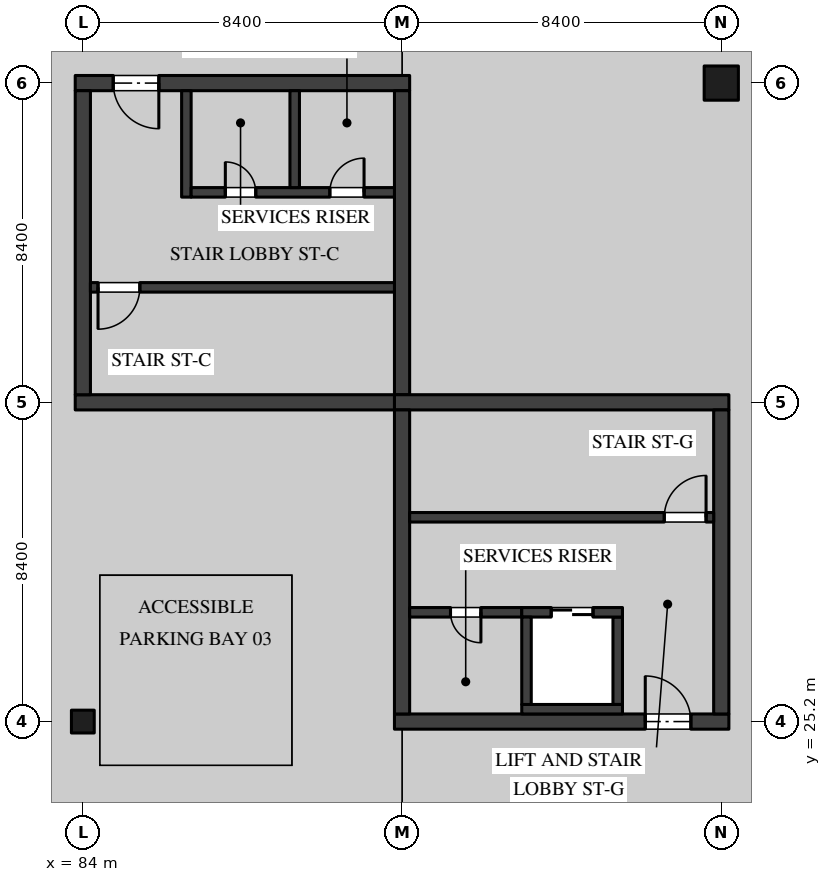
"""IFC4 building model, lengths in metres.
Left out: names, types, materials, properties, quantities, classifications, styles, units other than length and angle.
Written with IfcOpenShell. Run it as: python <this file> out.ifc"""

import sys

from ifc_helpers import new_model, si_unit, direction, frame, frame_2d, origin, origin_2d, place, context, subcontext, project, spatial, rectangle, extrude, element, fill, save


model = new_model("IFC4")
c1 = context("Model", 3, precision=1e-05, world=origin(), true_north=direction((0.0, 1.0)))
c2 = subcontext(c1, "Body", "Model", "MODEL_VIEW")
j1 = project(units=[si_unit("LENGTHUNIT", "METRE"), si_unit("PLANEANGLEUNIT", "RADIAN")], contexts=[c1])
p1 = place(None, origin())
s1 = spatial("IfcSite", under=j1, at=p1, CompositionType="ELEMENT")
p2 = place(p1, origin())
s2 = spatial("IfcBuilding", under=s1, at=p2, CompositionType="ELEMENT")
p3 = place(p2, frame((0.0, 0.0, -4.5)))
s3 = spatial("IfcBuildingStorey", under=s2, at=p3, CompositionType="ELEMENT", Elevation=-4.5)
p4 = place(p3, frame((84.0, 25.2, 0.0), z_axis=(0.0, 0.0, 1.0), x_axis=(1.0, 0.0, 0.0)))
e1 = element("IfcColumn", 1, at=p4, inside=s3, PredefinedType="COLUMN", context=c2, shape_type="SweptSolid", body=[
    extrude(rectangle(XDim=0.6, YDim=0.6, at=origin_2d()), origin(), (0.0, 0.0, 1.0), 4.05),
])
p5 = place(p3, frame((100.8, 42.0, 0.0), z_axis=(0.0, 0.0, 1.0), x_axis=(1.0, 0.0, 0.0)))
e2 = element("IfcColumn", 2, at=p5, inside=s3, PredefinedType="COLUMN", context=c2, shape_type="SweptSolid", body=[
    extrude(rectangle(XDim=0.9, YDim=0.9, at=origin_2d()), origin(), (0.0, 0.0, 1.0), 4.05),
])
p6 = place(p3, frame((83.8, 33.6, 0.0), z_axis=(0.0, 0.0, 1.0), x_axis=(1.0, 0.0, 0.0)))
e3 = element("IfcWall", 3, at=p6, inside=s3, PredefinedType="SHEAR", context=c2, shape_type="SweptSolid", body=[
    extrude(rectangle(XDim=8.8, YDim=0.4, at=frame_2d((4.4, 0.0))), origin(), (0.0, 0.0, 1.0), 4.05),
])
p7 = place(p3, frame((83.8, 42.0, 0.0), z_axis=(0.0, 0.0, 1.0), x_axis=(1.0, 0.0, 0.0)))
e4 = element("IfcWall", 4, at=p7, inside=s3, PredefinedType="SHEAR", context=c2, shape_type="SweptSolid", body=[
    extrude(rectangle(XDim=8.8, YDim=0.4, at=frame_2d((4.4, 0.0))), origin(), (0.0, 0.0, 1.0), 4.05),
])
p8 = place(p7, frame((1.0, 0.0, 0.0)))
e5 = element("IfcOpeningElement", 5, at=p8, cuts=e4, PredefinedType="OPENING", context=c2, shape_type="SweptSolid", body=[
    extrude(rectangle(XDim=1.2, YDim=2.1, at=frame_2d((0.6, 1.05))), frame((0.0, 0.21, 0.0), z_axis=(0.0, -1.0, 0.0), x_axis=(1.0, 0.0, 0.0)), (0.0, 0.0, 1.0), 0.42),
])
for number, where, z_axis, x_axis in (
    (6, (84.0, 33.8, 0.0), (0.0, 0.0, 1.0), (0.0, 1.0, 0.0)),
    (7, (92.4, 33.8, 0.0), (0.0, 0.0, 1.0), (0.0, 1.0, 0.0)),
):
    element("IfcWall", number, at=place(p3, frame(where, z_axis=z_axis, x_axis=x_axis)), inside=s3, PredefinedType="SHEAR", context=c2, shape_type="SweptSolid", body=[
        extrude(rectangle(XDim=8.0, YDim=0.4, at=frame_2d((4.0, 0.0))), origin(), (0.0, 0.0, 1.0), 4.05),
    ])
p9 = place(p3, frame((84.2, 36.625, 0.0), z_axis=(0.0, 0.0, 1.0), x_axis=(1.0, 0.0, 0.0)))
e8 = element("IfcWall", 8, at=p9, inside=s3, PredefinedType="SOLIDWALL", context=c2, shape_type="SweptSolid", body=[
    extrude(rectangle(XDim=8.0, YDim=0.25, at=frame_2d((4.0, 0.0))), origin(), (0.0, 0.0, 1.0), 4.05),
])
p10 = place(p9, frame((0.2, 0.0, 0.0)))
e9 = element("IfcOpeningElement", 9, at=p10, cuts=e8, PredefinedType="OPENING", context=c2, shape_type="SweptSolid", body=[
    extrude(rectangle(XDim=1.1, YDim=2.1, at=frame_2d((0.55, 1.05))), frame((0.0, 0.135, 0.0), z_axis=(0.0, -1.0, 0.0), x_axis=(1.0, 0.0, 0.0)), (0.0, 0.0, 1.0), 0.27),
])
p11 = place(p3, frame((86.725, 39.0, 0.0), z_axis=(0.0, 0.0, 1.0), x_axis=(0.0, 1.0, 0.0)))
e10 = element("IfcWall", 10, at=p11, inside=s3, PredefinedType="SOLIDWALL", context=c2, shape_type="SweptSolid", body=[
    extrude(rectangle(XDim=2.8, YDim=0.25, at=frame_2d((1.4, 0.0))), origin(), (0.0, 0.0, 1.0), 4.05),
])
p12 = place(p3, frame((86.85, 39.125, 0.0), z_axis=(0.0, 0.0, 1.0), x_axis=(1.0, 0.0, 0.0)))
e11 = element("IfcWall", 11, at=p12, inside=s3, PredefinedType="SOLIDWALL", context=c2, shape_type="SweptSolid", body=[
    extrude(rectangle(XDim=5.35, YDim=0.25, at=frame_2d((2.675, 0.0))), origin(), (0.0, 0.0, 1.0), 4.05),
])
p13 = place(p12, frame((3.65, 0.0, 0.0)))
e12 = element("IfcOpeningElement", 12, at=p13, cuts=e11, PredefinedType="OPENING", context=c2, shape_type="SweptSolid", body=[
    extrude(rectangle(XDim=0.9, YDim=2.1, at=frame_2d((0.45, 1.05))), frame((0.0, 0.135, 0.0), z_axis=(0.0, -1.0, 0.0), x_axis=(1.0, 0.0, 0.0)), (0.0, 0.0, 1.0), 0.27),
])
p14 = place(p12, frame((0.9, 0.0, 0.0)))
e13 = element("IfcOpeningElement", 13, at=p14, cuts=e11, PredefinedType="OPENING", context=c2, shape_type="SweptSolid", body=[
    extrude(rectangle(XDim=0.8, YDim=2.1, at=frame_2d((0.4, 1.05))), frame((0.0, 0.135, 0.0), z_axis=(0.0, -1.0, 0.0), x_axis=(1.0, 0.0, 0.0)), (0.0, 0.0, 1.0), 0.27),
])
p15 = place(p3, frame((89.575, 39.25, 0.0), z_axis=(0.0, 0.0, 1.0), x_axis=(0.0, 1.0, 0.0)))
e14 = element("IfcWall", 14, at=p15, inside=s3, PredefinedType="SOLIDWALL", context=c2, shape_type="SweptSolid", body=[
    extrude(rectangle(XDim=2.55, YDim=0.25, at=frame_2d((1.275, 0.0))), origin(), (0.0, 0.0, 1.0), 4.05),
])
p16 = place(p3, frame((92.2, 25.2, 0.0), z_axis=(0.0, 0.0, 1.0), x_axis=(1.0, 0.0, 0.0)))
e15 = element("IfcWall", 15, at=p16, inside=s3, PredefinedType="SHEAR", context=c2, shape_type="SweptSolid", body=[
    extrude(rectangle(XDim=8.8, YDim=0.4, at=frame_2d((4.4, 0.0))), origin(), (0.0, 0.0, 1.0), 4.05),
])
p17 = place(p16, frame((6.6, 0.0, 0.0)))
e16 = element("IfcOpeningElement", 16, at=p17, cuts=e15, PredefinedType="OPENING", context=c2, shape_type="SweptSolid", body=[
    extrude(rectangle(XDim=1.2, YDim=2.1, at=frame_2d((0.6, 1.05))), frame((0.0, 0.21, 0.0), z_axis=(0.0, -1.0, 0.0), x_axis=(1.0, 0.0, 0.0)), (0.0, 0.0, 1.0), 0.42),
])
p18 = place(p3, frame((92.2, 33.6, 0.0), z_axis=(0.0, 0.0, 1.0), x_axis=(1.0, 0.0, 0.0)))
e17 = element("IfcWall", 17, at=p18, inside=s3, PredefinedType="SHEAR", context=c2, shape_type="SweptSolid", body=[
    extrude(rectangle(XDim=8.8, YDim=0.4, at=frame_2d((4.4, 0.0))), origin(), (0.0, 0.0, 1.0), 4.05),
])
for number, where, z_axis, x_axis in (
    (18, (92.4, 25.4, 0.0), (0.0, 0.0, 1.0), (0.0, 1.0, 0.0)),
    (19, (100.8, 25.4, 0.0), (0.0, 0.0, 1.0), (0.0, 1.0, 0.0)),
):
    element("IfcWall", number, at=place(p3, frame(where, z_axis=z_axis, x_axis=x_axis)), inside=s3, PredefinedType="SHEAR", context=c2, shape_type="SweptSolid", body=[
        extrude(rectangle(XDim=8.0, YDim=0.4, at=frame_2d((4.0, 0.0))), origin(), (0.0, 0.0, 1.0), 4.05),
    ])
p19 = place(p3, frame((100.6, 30.575, 0.0), z_axis=(0.0, 0.0, 1.0), x_axis=(-1.0, 0.0, 0.0)))
e20 = element("IfcWall", 20, at=p19, inside=s3, PredefinedType="SOLIDWALL", context=c2, shape_type="SweptSolid", body=[
    extrude(rectangle(XDim=8.0, YDim=0.25, at=frame_2d((4.0, 0.0))), origin(), (0.0, 0.0, 1.0), 4.05),
])
p20 = place(p19, frame((0.2, 0.0, 0.0)))
e21 = element("IfcOpeningElement", 21, at=p20, cuts=e20, PredefinedType="OPENING", context=c2, shape_type="SweptSolid", body=[
    extrude(rectangle(XDim=1.1, YDim=2.1, at=frame_2d((0.55, 1.05))), frame((0.0, 0.135, 0.0), z_axis=(0.0, -1.0, 0.0), x_axis=(1.0, 0.0, 0.0)), (0.0, 0.0, 1.0), 0.27),
])
p21 = place(p3, frame((95.55, 28.075, 0.0), z_axis=(0.0, 0.0, 1.0), x_axis=(-1.0, 0.0, 0.0)))
e22 = element("IfcWall", 22, at=p21, inside=s3, PredefinedType="SOLIDWALL", context=c2, shape_type="SweptSolid", body=[
    extrude(rectangle(XDim=2.95, YDim=0.25, at=frame_2d((1.475, 0.0))), origin(), (0.0, 0.0, 1.0), 4.05),
])
p22 = place(p21, frame((1.075, 0.0, 0.0)))
e23 = element("IfcOpeningElement", 23, at=p22, cuts=e22, PredefinedType="OPENING", context=c2, shape_type="SweptSolid", body=[
    extrude(rectangle(XDim=0.8, YDim=2.1, at=frame_2d((0.4, 1.05))), frame((0.0, 0.135, 0.0), z_axis=(0.0, -1.0, 0.0), x_axis=(1.0, 0.0, 0.0)), (0.0, 0.0, 1.0), 0.27),
])
p23 = place(p3, frame((98.075, 25.65, 0.0), z_axis=(0.0, 0.0, 1.0), x_axis=(0.0, 1.0, 0.0)))
e24 = element("IfcWall", 24, at=p23, inside=s3, PredefinedType="SOLIDWALL", context=c2, shape_type="SweptSolid", body=[
    extrude(rectangle(XDim=2.3, YDim=0.25, at=frame_2d((1.15, 0.0))), origin(), (0.0, 0.0, 1.0), 4.05),
])
p24 = place(p3, frame((95.55, 28.075, 0.0), z_axis=(0.0, 0.0, 1.0), x_axis=(1.0, 0.0, 0.0)))
e25 = element("IfcWall", 25, at=p24, inside=s3, PredefinedType="SOLIDWALL", context=c2, shape_type="SweptSolid", body=[
    extrude(rectangle(XDim=2.65, YDim=0.25, at=frame_2d((1.325, 0.0))), origin(), (0.0, 0.0, 1.0), 4.05),
])
p25 = place(p24, frame((0.775, 0.0, 0.0)))
e26 = element("IfcOpeningElement", 26, at=p25, cuts=e25, PredefinedType="OPENING", context=c2, shape_type="SweptSolid", body=[
    extrude(rectangle(XDim=1.1, YDim=2.1, at=frame_2d((0.55, 1.05))), frame((0.0, 0.135, 0.0), z_axis=(0.0, -1.0, 0.0), x_axis=(1.0, 0.0, 0.0)), (0.0, 0.0, 1.0), 0.27),
])
p26 = place(p3, frame((95.55, 25.525, 0.0), z_axis=(0.0, 0.0, 1.0), x_axis=(1.0, 0.0, 0.0)))
e27 = element("IfcWall", 27, at=p26, inside=s3, PredefinedType="SOLIDWALL", context=c2, shape_type="SweptSolid", body=[
    extrude(rectangle(XDim=2.65, YDim=0.25, at=frame_2d((1.325, 0.0))), origin(), (0.0, 0.0, 1.0), 4.05),
])
p27 = place(p3, frame((95.675, 25.65, 0.0), z_axis=(0.0, 0.0, 1.0), x_axis=(0.0, 1.0, 0.0)))
e28 = element("IfcWall", 28, at=p27, inside=s3, PredefinedType="SOLIDWALL", context=c2, shape_type="SweptSolid", body=[
    extrude(rectangle(XDim=2.3, YDim=0.25, at=frame_2d((1.15, 0.0))), origin(), (0.0, 0.0, 1.0), 4.05),
])
p28 = place(p13, origin())
e29 = element("IfcDoor", 29, at=p28, inside=s3, OperationType="SINGLE_SWING_LEFT", PredefinedType="DOOR", context=c2, shape_type="SweptSolid", body=[
    extrude(rectangle(XDim=0.9, YDim=2.1, at=frame_2d((0.45, 1.05))), frame((0.0, 0.035, 0.0), z_axis=(0.0, -1.0, 0.0), x_axis=(1.0, 0.0, 0.0)), (0.0, 0.0, 1.0), 0.07),
])
fill(e12, e29)
p29 = place(p8, frame((1.2, 0.0, 0.0), z_axis=(0.0, 0.0, 1.0), x_axis=(-1.0, 0.0, 0.0)))
e30 = element("IfcDoor", 30, at=p29, inside=s3, OperationType="SINGLE_SWING_RIGHT", PredefinedType="DOOR", context=c2, shape_type="SweptSolid", body=[
    extrude(rectangle(XDim=1.2, YDim=2.1, at=frame_2d((0.6, 1.05))), frame((0.0, 0.035, 0.0), z_axis=(0.0, -1.0, 0.0), x_axis=(1.0, 0.0, 0.0)), (0.0, 0.0, 1.0), 0.07),
])
fill(e5, e30)
p30 = place(p14, origin())
e31 = element("IfcDoor", 31, at=p30, inside=s3, OperationType="SINGLE_SWING_RIGHT", PredefinedType="DOOR", context=c2, shape_type="SweptSolid", body=[
    extrude(rectangle(XDim=0.8, YDim=2.1, at=frame_2d((0.4, 1.05))), frame((0.0, 0.035, 0.0), z_axis=(0.0, -1.0, 0.0), x_axis=(1.0, 0.0, 0.0)), (0.0, 0.0, 1.0), 0.07),
])
fill(e13, e31)
p31 = place(p10, frame((1.1, 0.0, 0.0), z_axis=(0.0, 0.0, 1.0), x_axis=(-1.0, 0.0, 0.0)))
e32 = element("IfcDoor", 32, at=p31, inside=s3, OperationType="SINGLE_SWING_LEFT", PredefinedType="DOOR", context=c2, shape_type="SweptSolid", body=[
    extrude(rectangle(XDim=1.1, YDim=2.1, at=frame_2d((0.55, 1.05))), frame((0.0, 0.035, 0.0), z_axis=(0.0, -1.0, 0.0), x_axis=(1.0, 0.0, 0.0)), (0.0, 0.0, 1.0), 0.07),
])
fill(e9, e32)
p32 = place(p17, origin())
e33 = element("IfcDoor", 33, at=p32, inside=s3, OperationType="SINGLE_SWING_RIGHT", PredefinedType="DOOR", context=c2, shape_type="SweptSolid", body=[
    extrude(rectangle(XDim=1.2, YDim=2.1, at=frame_2d((0.6, 1.05))), frame((0.0, 0.035, 0.0), z_axis=(0.0, -1.0, 0.0), x_axis=(1.0, 0.0, 0.0)), (0.0, 0.0, 1.0), 0.07),
])
fill(e16, e33)
p33 = place(p22, origin())
e34 = element("IfcDoor", 34, at=p33, inside=s3, OperationType="SINGLE_SWING_RIGHT", PredefinedType="DOOR", context=c2, shape_type="SweptSolid", body=[
    extrude(rectangle(XDim=0.8, YDim=2.1, at=frame_2d((0.4, 1.05))), frame((0.0, 0.035, 0.0), z_axis=(0.0, -1.0, 0.0), x_axis=(1.0, 0.0, 0.0)), (0.0, 0.0, 1.0), 0.07),
])
fill(e23, e34)
p34 = place(p20, frame((1.1, 0.0, 0.0), z_axis=(0.0, 0.0, 1.0), x_axis=(-1.0, 0.0, 0.0)))
e35 = element("IfcDoor", 35, at=p34, inside=s3, OperationType="SINGLE_SWING_LEFT", PredefinedType="DOOR", context=c2, shape_type="SweptSolid", body=[
    extrude(rectangle(XDim=1.1, YDim=2.1, at=frame_2d((0.55, 1.05))), frame((0.0, 0.035, 0.0), z_axis=(0.0, -1.0, 0.0), x_axis=(1.0, 0.0, 0.0)), (0.0, 0.0, 1.0), 0.07),
])
fill(e21, e35)
p35 = place(p25, origin())
e36 = element("IfcDoor", 36, at=p35, inside=s3, OperationType="DOUBLE_DOOR_SLIDING", PredefinedType="DOOR", context=c2, shape_type="SweptSolid", body=[
    extrude(rectangle(XDim=1.1, YDim=2.1, at=frame_2d((0.55, 1.05))), frame((0.0, 0.04, 0.0), z_axis=(0.0, -1.0, 0.0), x_axis=(1.0, 0.0, 0.0)), (0.0, 0.0, 1.0), 0.08),
])
fill(e26, e36)
save(model, sys.argv[1])
